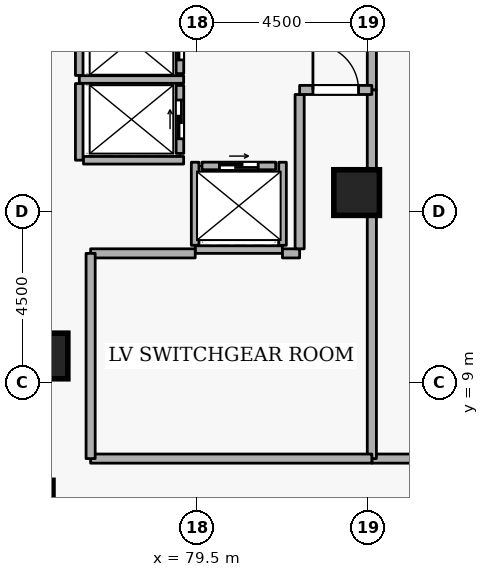
"""IFC4 building model, lengths in metres.
Left out: names, types, materials, properties, quantities, classifications, styles, units other than length and angle.
Written with IfcOpenShell. Run it as: python <this file> out.ifc"""

import sys

from ifc_helpers import new_model, si_unit, direction, frame, frame_2d, origin, origin_2d, place, context, subcontext, project, spatial, rectangle, i_section, extrude, element, fill, save


model = new_model("IFC4")
c1 = context("Model", 3, precision=1e-05, world=origin(), true_north=direction((0.0, 1.0)))
c2 = subcontext(c1, "Body", "Model", "MODEL_VIEW")
j1 = project(units=[si_unit("LENGTHUNIT", "METRE"), si_unit("PLANEANGLEUNIT", "RADIAN")], contexts=[c1])
p1 = place(None, origin())
s1 = spatial("IfcSite", under=j1, at=p1, CompositionType="ELEMENT")
p2 = place(p1, origin())
s2 = spatial("IfcBuilding", under=s1, at=p2, CompositionType="ELEMENT")
p3 = place(p2, frame((0.0, 0.0, 141.3)))
s3 = spatial("IfcBuildingStorey", under=s2, at=p3, CompositionType="ELEMENT", Elevation=141.3)
for number, where, z_axis, x_axis in (
    (1, (75.5, 9.7, 0.0), (0.0, 0.0, 1.0), (1.0, 0.0, 0.0)),
    (2, (83.7, 14.0, 0.0), (0.0, 0.0, 1.0), (1.0, 0.0, 0.0)),
):
    element("IfcColumn", number, at=place(p3, frame(where, z_axis=z_axis, x_axis=x_axis)), inside=s3, PredefinedType="COLUMN", context=c2, shape_type="SweptSolid", body=[
        extrude(rectangle(XDim=1.2, YDim=1.2, at=origin_2d()), origin(), (0.0, 0.0, 1.0), 4.2),
    ])
p4 = place(p3, frame((75.5, 6.2, 0.0), z_axis=(0.0, 0.0, 1.0), x_axis=(1.0, 0.0, 0.0)))
e3 = element("IfcColumn", 3, at=p4, inside=s3, PredefinedType="COLUMN", context=c2, shape_type="SweptSolid", body=[
    extrude(i_section(OverallWidth=0.418, OverallDepth=0.456, WebThickness=0.042, FlangeThickness=0.067, FilletRadius=0.015, at=origin_2d()), origin(), (0.0, 0.0, 1.0), 4.2),
])
p5 = place(p3, frame((79.05, 17.13, 0.0), z_axis=(0.0, 0.0, 1.0), x_axis=(0.0, 1.0, 0.0)))
e4 = element("IfcWall", 4, at=p5, inside=s3, PredefinedType="STANDARD", context=c2, shape_type="SweptSolid", body=[
    extrude(rectangle(XDim=1.74, YDim=0.2, at=frame_2d((0.87, 0.0))), origin(), (0.0, 0.0, 1.0), 3.94),
])
p6 = place(p5, frame((0.36, 0.0, 0.0)))
e5 = element("IfcOpeningElement", 5, at=p6, cuts=e4, PredefinedType="OPENING", context=c2, shape_type="SweptSolid", body=[
    extrude(rectangle(XDim=1.02, YDim=2.06, at=frame_2d((0.51, 1.03))), frame((0.0, 0.11, 0.0), z_axis=(0.0, -1.0, 0.0), x_axis=(1.0, 0.0, 0.0)), (0.0, 0.0, 1.0), 0.22),
])
p7 = place(p3, frame((79.05, 15.03, 0.0), z_axis=(0.0, 0.0, 1.0), x_axis=(0.0, 1.0, 0.0)))
e6 = element("IfcWall", 6, at=p7, inside=s3, PredefinedType="STANDARD", context=c2, shape_type="SweptSolid", body=[
    extrude(rectangle(XDim=1.79, YDim=0.2, at=frame_2d((0.895, 0.0))), origin(), (0.0, 0.0, 1.0), 3.94),
])
p8 = place(p7, frame((0.385, 0.0, 0.0)))
e7 = element("IfcOpeningElement", 7, at=p8, cuts=e6, PredefinedType="OPENING", context=c2, shape_type="SweptSolid", body=[
    extrude(rectangle(XDim=1.02, YDim=2.06, at=frame_2d((0.51, 1.03))), frame((0.0, 0.11, 0.0), z_axis=(0.0, -1.0, 0.0), x_axis=(1.0, 0.0, 0.0)), (0.0, 0.0, 1.0), 0.22),
])
p9 = place(p3, frame((79.63, 14.7, 0.0), z_axis=(0.0, 0.0, 1.0), x_axis=(1.0, 0.0, 0.0)))
e8 = element("IfcWall", 8, at=p9, inside=s3, PredefinedType="STANDARD", context=c2, shape_type="SweptSolid", body=[
    extrude(rectangle(XDim=1.94, YDim=0.2, at=frame_2d((0.97, 0.0))), origin(), (0.0, 0.0, 1.0), 3.94),
])
p10 = place(p9, frame((0.46, 0.0, 0.0)))
e9 = element("IfcOpeningElement", 9, at=p10, cuts=e8, PredefinedType="OPENING", context=c2, shape_type="SweptSolid", body=[
    extrude(rectangle(XDim=1.02, YDim=2.06, at=frame_2d((0.51, 1.03))), frame((0.0, 0.11, 0.0), z_axis=(0.0, -1.0, 0.0), x_axis=(1.0, 0.0, 0.0)), (0.0, 0.0, 1.0), 0.22),
])
p11 = place(p3, frame((76.402, 16.975, 0.0), z_axis=(0.0, 0.0, 1.0), x_axis=(1.0, 0.0, 0.0)))
e10 = element("IfcWall", 10, at=p11, inside=s3, PredefinedType="STANDARD", context=c2, shape_type="SweptSolid", body=[
    extrude(rectangle(XDim=2.746, YDim=0.2, at=frame_2d((1.373, 0.0))), origin(), (0.0, 0.0, 1.0), 3.94),
])
p12 = place(p3, frame((76.4, 14.852, 0.0), z_axis=(0.0, 0.0, 1.0), x_axis=(0.0, 1.0, 0.0)))
e11 = element("IfcWall", 11, at=p12, inside=s3, PredefinedType="STANDARD", context=c2, shape_type="SweptSolid", body=[
    extrude(rectangle(XDim=2.016, YDim=0.2, at=frame_2d((1.008, 0.0))), origin(), (0.0, 0.0, 1.0), 3.94),
])
p13 = place(p3, frame((76.4, 17.082, 0.0), z_axis=(0.0, 0.0, 1.0), x_axis=(0.0, 1.0, 0.0)))
e12 = element("IfcWall", 12, at=p13, inside=s3, PredefinedType="STANDARD", context=c2, shape_type="SweptSolid", body=[
    extrude(rectangle(XDim=1.856, YDim=0.2, at=frame_2d((0.928, 0.0))), origin(), (0.0, 0.0, 1.0), 3.94),
])
p14 = place(p3, frame((76.512, 14.85, 0.0), z_axis=(0.0, 0.0, 1.0), x_axis=(1.0, 0.0, 0.0)))
e13 = element("IfcWall", 13, at=p14, inside=s3, PredefinedType="STANDARD", context=c2, shape_type="SweptSolid", body=[
    extrude(rectangle(XDim=2.636, YDim=0.2, at=frame_2d((1.318, 0.0))), origin(), (0.0, 0.0, 1.0), 3.94),
])
p15 = place(p3, frame((79.452, 12.5, 0.0), z_axis=(0.0, 0.0, 1.0), x_axis=(1.0, 0.0, 0.0)))
e14 = element("IfcWall", 14, at=p15, inside=s3, PredefinedType="STANDARD", context=c2, shape_type="SweptSolid", body=[
    extrude(rectangle(XDim=2.296, YDim=0.2, at=frame_2d((1.148, 0.0))), origin(), (0.0, 0.0, 1.0), 3.94),
])
for number, where, z_axis, x_axis in (
    (15, (81.75, 12.612, 0.0), (0.0, 0.0, 1.0), (0.0, 1.0, 0.0)),
    (16, (79.45, 12.612, 0.0), (0.0, 0.0, 1.0), (0.0, 1.0, 0.0)),
):
    element("IfcWall", number, at=place(p3, frame(where, z_axis=z_axis, x_axis=x_axis)), inside=s3, PredefinedType="STANDARD", context=c2, shape_type="SweptSolid", body=[
        extrude(rectangle(XDim=2.186, YDim=0.2, at=frame_2d((1.093, 0.0))), origin(), (0.0, 0.0, 1.0), 3.94),
    ])
p16 = place(p3, frame((84.1, 16.7, 0.0), z_axis=(0.0, 0.0, 1.0), x_axis=(0.0, 1.0, 0.0)))
e17 = element("IfcWall", 17, at=p16, inside=s3, PredefinedType="STANDARD", context=c2, shape_type="SweptSolid", body=[
    extrude(rectangle(XDim=2.9, YDim=0.24, at=frame_2d((1.45, 0.0))), origin(), (0.0, 0.0, 1.0), 3.94),
])
p17 = place(p3, frame((88.5, 7.0, 0.0), z_axis=(0.0, 0.0, 1.0), x_axis=(-1.0, 0.0, 0.0)))
e18 = element("IfcWall", 18, at=p17, inside=s3, PredefinedType="STANDARD", context=c2, shape_type="SweptSolid", body=[
    extrude(rectangle(XDim=4.4, YDim=0.24, at=frame_2d((2.2, 0.0))), origin(), (0.0, 0.0, 1.0), 3.94),
])
p18 = place(p3, frame((84.1, 7.0, 0.0), z_axis=(0.0, 0.0, 1.0), x_axis=(0.0, 1.0, 0.0)))
e19 = element("IfcWall", 19, at=p18, inside=s3, PredefinedType="STANDARD", context=c2, shape_type="SweptSolid", body=[
    extrude(rectangle(XDim=9.7, YDim=0.24, at=frame_2d((4.85, 0.0))), origin(), (0.0, 0.0, 1.0), 3.94),
])
p19 = place(p3, frame((76.7, 12.4, 0.0), z_axis=(0.0, 0.0, 1.0), x_axis=(1.0, 0.0, 0.0)))
e20 = element("IfcWall", 20, at=p19, inside=s3, PredefinedType="STANDARD", context=c2, shape_type="SweptSolid", body=[
    extrude(rectangle(XDim=2.752, YDim=0.24, at=frame_2d((1.376, 0.0))), origin(), (0.0, 0.0, 1.0), 3.94),
])
p20 = place(p3, frame((81.748, 12.4, 0.0), z_axis=(0.0, 0.0, 1.0), x_axis=(1.0, 0.0, 0.0)))
e21 = element("IfcWall", 21, at=p20, inside=s3, PredefinedType="STANDARD", context=c2, shape_type="SweptSolid", body=[
    extrude(rectangle(XDim=0.452, YDim=0.24, at=frame_2d((0.226, 0.0))), origin(), (0.0, 0.0, 1.0), 3.94),
])
p21 = place(p3, frame((82.2, 12.52, 0.0), z_axis=(0.0, 0.0, 1.0), x_axis=(0.0, 1.0, 0.0)))
e22 = element("IfcWall", 22, at=p21, inside=s3, PredefinedType="STANDARD", context=c2, shape_type="SweptSolid", body=[
    extrude(rectangle(XDim=4.06, YDim=0.24, at=frame_2d((2.03, 0.0))), origin(), (0.0, 0.0, 1.0), 3.94),
])
p22 = place(p3, frame((82.2, 16.7, 0.0), z_axis=(0.0, 0.0, 1.0), x_axis=(1.0, 0.0, 0.0)))
e23 = element("IfcWall", 23, at=p22, inside=s3, PredefinedType="STANDARD", context=c2, shape_type="SweptSolid", body=[
    extrude(rectangle(XDim=1.9, YDim=0.24, at=frame_2d((0.95, 0.0))), origin(), (0.0, 0.0, 1.0), 3.94),
])
p23 = place(p22, frame((0.35, 0.0, 0.0)))
e24 = element("IfcOpeningElement", 24, at=p23, cuts=e23, PredefinedType="OPENING", context=c2, shape_type="SweptSolid", body=[
    extrude(rectangle(XDim=1.2, YDim=2.1, at=frame_2d((0.6, 1.05))), frame((0.0, 0.13, 0.0), z_axis=(0.0, -1.0, 0.0), x_axis=(1.0, 0.0, 0.0)), (0.0, 0.0, 1.0), 0.26),
])
p24 = place(p3, frame((84.1, 7.0, 0.0), z_axis=(0.0, 0.0, 1.0), x_axis=(-1.0, 0.0, 0.0)))
e25 = element("IfcWall", 25, at=p24, inside=s3, PredefinedType="STANDARD", context=c2, shape_type="SweptSolid", body=[
    extrude(rectangle(XDim=7.4, YDim=0.24, at=frame_2d((3.7, 0.0))), origin(), (0.0, 0.0, 1.0), 3.445),
])
p25 = place(p3, frame((76.7, 7.0, 0.0), z_axis=(0.0, 0.0, 1.0), x_axis=(0.0, 1.0, 0.0)))
e26 = element("IfcWall", 26, at=p25, inside=s3, PredefinedType="STANDARD", context=c2, shape_type="SweptSolid", body=[
    extrude(rectangle(XDim=5.4, YDim=0.24, at=frame_2d((2.7, 0.0))), origin(), (0.0, 0.0, 1.0), 3.94),
])
p26 = place(p6, origin())
e27 = element("IfcDoor", 27, at=p26, inside=s3, OperationType="SLIDING_TO_LEFT", PredefinedType="DOOR", context=c2, shape_type="SweptSolid", body=[
    extrude(rectangle(XDim=1.02, YDim=2.06, at=frame_2d((0.51, 1.03))), frame((0.0, 0.025, 0.0), z_axis=(0.0, -1.0, 0.0), x_axis=(1.0, 0.0, 0.0)), (0.0, 0.0, 1.0), 0.05),
])
fill(e5, e27)
p27 = place(p8, origin())
e28 = element("IfcDoor", 28, at=p27, inside=s3, OperationType="SLIDING_TO_LEFT", PredefinedType="DOOR", context=c2, shape_type="SweptSolid", body=[
    extrude(rectangle(XDim=1.02, YDim=2.06, at=frame_2d((0.51, 1.03))), frame((0.0, 0.025, 0.0), z_axis=(0.0, -1.0, 0.0), x_axis=(1.0, 0.0, 0.0)), (0.0, 0.0, 1.0), 0.05),
])
fill(e7, e28)
p28 = place(p10, origin())
e29 = element("IfcDoor", 29, at=p28, inside=s3, OperationType="SLIDING_TO_LEFT", PredefinedType="DOOR", context=c2, shape_type="SweptSolid", body=[
    extrude(rectangle(XDim=1.02, YDim=2.06, at=frame_2d((0.51, 1.03))), frame((0.0, 0.025, 0.0), z_axis=(0.0, -1.0, 0.0), x_axis=(1.0, 0.0, 0.0)), (0.0, 0.0, 1.0), 0.05),
])
fill(e9, e29)
p29 = place(p23, origin())
e30 = element("IfcDoor", 30, at=p29, inside=s3, OperationType="SINGLE_SWING_LEFT", PredefinedType="DOOR", context=c2, shape_type="SweptSolid", body=[
    extrude(rectangle(XDim=1.2, YDim=2.1, at=frame_2d((0.6, 1.05))), frame((0.0, 0.025, 0.0), z_axis=(0.0, -1.0, 0.0), x_axis=(1.0, 0.0, 0.0)), (0.0, 0.0, 1.0), 0.05),
])
fill(e24, e30)
save(model, sys.argv[1])
